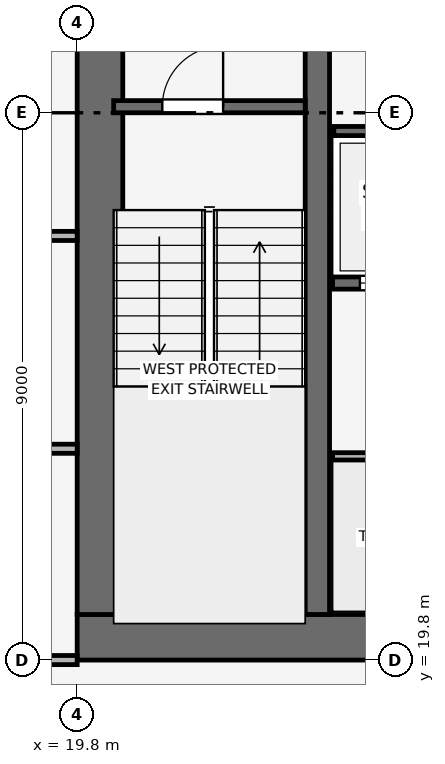
"""IFC4 building model, lengths in metres.
Left out: names, types, materials, properties, quantities, classifications, styles, units other than length and angle.
Written with IfcOpenShell. Run it as: python <this file> out.ifc"""

import sys

from ifc_helpers import new_model, si_unit, direction, frame, frame_2d, origin, place, context, subcontext, project, spatial, rectangle, extrude, element, fill, save


model = new_model("IFC4")
c1 = context("Model", 3, precision=1e-05, world=origin(), true_north=direction((0.0, 1.0)))
c2 = subcontext(c1, "Body", "Model", "MODEL_VIEW")
j1 = project(units=[si_unit("LENGTHUNIT", "METRE"), si_unit("PLANEANGLEUNIT", "RADIAN")], contexts=[c1])
p1 = place(None, origin())
s1 = spatial("IfcSite", under=j1, at=p1, CompositionType="ELEMENT")
p2 = place(p1, origin())
s2 = spatial("IfcBuilding", under=s1, at=p2, CompositionType="ELEMENT")
p3 = place(p2, frame((0.0, 0.0, 199.95)))
s3 = spatial("IfcBuildingStorey", under=s2, at=p3, CompositionType="ELEMENT", Elevation=199.95)
p4 = place(p3, frame((19.8, 20.175, 0.0), z_axis=(0.0, 0.0, 1.0), x_axis=(1.0, 0.0, 0.0)))
e1 = element("IfcWall", 1, at=p4, inside=s3, PredefinedType="SHEAR", context=c2, shape_type="SweptSolid", body=[
    extrude(rectangle(XDim=18.0, YDim=0.75, at=frame_2d((9.0, 0.0))), origin(), (0.0, 0.0, 1.0), 3.75),
])
p5 = place(p4, frame((8.4, 0.0, 0.0)))
e2 = element("IfcOpeningElement", 2, at=p5, cuts=e1, PredefinedType="OPENING", context=c2, shape_type="SweptSolid", body=[
    extrude(rectangle(XDim=1.2, YDim=2.2, at=frame_2d((0.6, 1.1))), frame((0.0, 0.385, 0.0), z_axis=(0.0, -1.0, 0.0), x_axis=(1.0, 0.0, 0.0)), (0.0, 0.0, 1.0), 0.77),
])
p6 = place(p3, frame((20.175, 20.55, 0.0), z_axis=(0.0, 0.0, 1.0), x_axis=(0.0, 1.0, 0.0)))
e3 = element("IfcWall", 3, at=p6, inside=s3, PredefinedType="SHEAR", context=c2, shape_type="SweptSolid", body=[
    extrude(rectangle(XDim=16.5, YDim=0.75, at=frame_2d((8.25, 0.0))), origin(), (0.0, 0.0, 1.0), 3.75),
])
p7 = place(p6, frame((10.25, 0.0, 0.0)))
e4 = element("IfcOpeningElement", 4, at=p7, cuts=e3, PredefinedType="OPENING", context=c2, shape_type="SweptSolid", body=[
    extrude(rectangle(XDim=1.1, YDim=2.15, at=frame_2d((0.55, 1.075))), frame((0.0, 0.385, 0.0), z_axis=(0.0, -1.0, 0.0), x_axis=(1.0, 0.0, 0.0)), (0.0, 0.0, 1.0), 0.77),
])
p8 = place(p3, frame((23.75, 20.55, 0.0), z_axis=(0.0, 0.0, 1.0), x_axis=(0.0, 1.0, 0.0)))
e5 = element("IfcWall", 5, at=p8, inside=s3, PredefinedType="SHEAR", context=c2, shape_type="SweptSolid", body=[
    extrude(rectangle(XDim=16.5, YDim=0.4, at=frame_2d((8.25, 0.0))), origin(), (0.0, 0.0, 1.0), 3.75),
])
p9 = place(p3, frame((20.4, 28.9, 0.0), z_axis=(0.0, 0.0, 1.0), x_axis=(1.0, 0.0, 0.0)))
e6 = element("IfcWall", 6, at=p9, inside=s3, PredefinedType="SHEAR", context=c2, shape_type="SweptSolid", body=[
    extrude(rectangle(XDim=3.15, YDim=0.2, at=frame_2d((1.575, 0.0))), origin(), (0.0, 0.0, 1.0), 3.5),
])
p10 = place(p9, frame((0.8, 0.0, 0.0)))
e7 = element("IfcOpeningElement", 7, at=p10, cuts=e6, PredefinedType="OPENING", context=c2, shape_type="SweptSolid", body=[
    extrude(rectangle(XDim=1.0, YDim=2.1, at=frame_2d((0.5, 1.05))), frame((0.0, 0.11, 0.0), z_axis=(0.0, -1.0, 0.0), x_axis=(1.0, 0.0, 0.0)), (0.0, 0.0, 1.0), 0.22),
])
p11 = place(p3, frame((24.0, 26.0, 0.0), z_axis=(0.0, 0.0, 1.0), x_axis=(1.0, 0.0, 0.0)))
e8 = element("IfcWall", 8, at=p11, inside=s3, PredefinedType="SHEAR", context=c2, shape_type="SweptSolid", body=[
    extrude(rectangle(XDim=2.0, YDim=0.2, at=frame_2d((1.0, 0.0))), origin(), (0.0, 0.0, 1.0), 3.5),
])
p12 = place(p11, frame((0.45, 0.0, 0.0)))
e9 = element("IfcOpeningElement", 9, at=p12, cuts=e8, PredefinedType="OPENING", context=c2, shape_type="SweptSolid", body=[
    extrude(rectangle(XDim=1.1, YDim=2.15, at=frame_2d((0.55, 1.075))), frame((0.0, 0.11, 0.0), z_axis=(0.0, -1.0, 0.0), x_axis=(1.0, 0.0, 0.0)), (0.0, 0.0, 1.0), 0.22),
])
p13 = place(p3, frame((24.02, 28.5, 0.0), z_axis=(0.0, 0.0, 1.0), x_axis=(1.0, 0.0, 0.0)))
e10 = element("IfcWall", 10, at=p13, inside=s3, PredefinedType="SHEAR", context=c2, shape_type="SweptSolid", body=[
    extrude(rectangle(XDim=4.08, YDim=0.15, at=frame_2d((2.04, 0.0))), origin(), (0.0, 0.0, 1.0), 3.5),
])
p14 = place(p3, frame((24.0, 23.15, 0.0), z_axis=(0.0, 0.0, 1.0), x_axis=(1.0, 0.0, 0.0)))
e11 = element("IfcWall", 11, at=p14, inside=s3, PredefinedType="PARTITIONING", context=c2, shape_type="SweptSolid", body=[
    extrude(rectangle(XDim=4.05, YDim=0.12, at=frame_2d((2.025, 0.0))), origin(), (0.0, 0.0, 1.0), 3.5),
])
p15 = place(p14, frame((1.575, 0.0, 0.0)))
e12 = element("IfcOpeningElement", 12, at=p15, cuts=e11, PredefinedType="OPENING", context=c2, shape_type="SweptSolid", body=[
    extrude(rectangle(XDim=0.9, YDim=2.1, at=frame_2d((0.45, 1.05))), frame((0.0, 0.07, 0.0), z_axis=(0.0, -1.0, 0.0), x_axis=(1.0, 0.0, 0.0)), (0.0, 0.0, 1.0), 0.14),
])
p16 = place(p3, frame((15.4, 19.8, 0.0), z_axis=(0.0, 0.0, 1.0), x_axis=(1.0, 0.0, 0.0)))
e13 = element("IfcWall", 13, at=p16, inside=s3, PredefinedType="PARTITIONING", context=c2, shape_type="SweptSolid", body=[
    extrude(rectangle(XDim=4.4, YDim=0.15, at=frame_2d((2.2, 0.0))), origin(), (0.0, 0.0, 1.0), 3.035),
])
for number, where, z_axis, x_axis in (
    (14, (15.4, 23.275, 0.0), (0.0, 0.0, 1.0), (1.0, 0.0, 0.0)),
    (15, (15.4, 26.775, 0.0), (0.0, 0.0, 1.0), (1.0, 0.0, 0.0)),
):
    element("IfcWall", number, at=place(p3, frame(where, z_axis=z_axis, x_axis=x_axis)), inside=s3, PredefinedType="PARTITIONING", context=c2, shape_type="SweptSolid", body=[
        extrude(rectangle(XDim=4.4, YDim=0.15, at=frame_2d((2.2, 0.0))), origin(), (0.0, 0.0, 1.0), 3.5),
    ])
p17 = place(p10, origin())
e16 = element("IfcDoor", 16, at=p17, inside=s3, OperationType="SINGLE_SWING_RIGHT", PredefinedType="DOOR", context=c2, shape_type="SweptSolid", body=[
    extrude(rectangle(XDim=1.0, YDim=2.1, at=frame_2d((0.5, 1.05))), frame((0.0, 0.025, 0.0), z_axis=(0.0, -1.0, 0.0), x_axis=(1.0, 0.0, 0.0)), (0.0, 0.0, 1.0), 0.05),
])
fill(e7, e16)
p18 = place(p12, origin())
e17 = element("IfcDoor", 17, at=p18, inside=s3, OperationType="SLIDING_TO_RIGHT", PredefinedType="DOOR", context=c2, shape_type="SweptSolid", body=[
    extrude(rectangle(XDim=1.1, YDim=2.15, at=frame_2d((0.55, 1.075))), frame((0.0, 0.025, 0.0), z_axis=(0.0, -1.0, 0.0), x_axis=(1.0, 0.0, 0.0)), (0.0, 0.0, 1.0), 0.05),
])
fill(e9, e17)
save(model, sys.argv[1])
